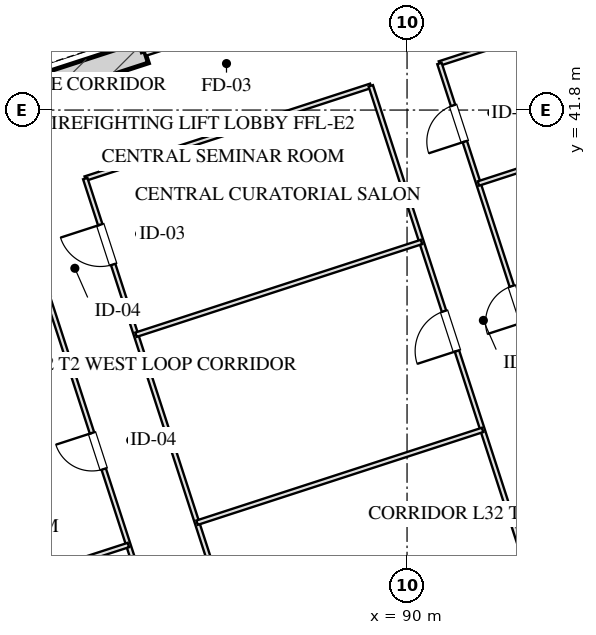
"""IFC4 building model, lengths in metres.
Left out: names, types, materials, properties, quantities, classifications, styles, units other than length and angle.
Written with IfcOpenShell. Run it as: python <this file> out.ifc"""

import sys

from ifc_helpers import new_model, si_unit, direction, frame, frame_2d, origin, place, context, subcontext, project, spatial, rectangle, extrude, element, fill, save


model = new_model("IFC4")
c1 = context("Model", 3, precision=1e-05, world=origin(), true_north=direction((0.0, 1.0)))
c2 = subcontext(c1, "Body", "Model", "MODEL_VIEW")
j1 = project(units=[si_unit("LENGTHUNIT", "METRE"), si_unit("PLANEANGLEUNIT", "RADIAN")], contexts=[c1])
p1 = place(None, origin())
s1 = spatial("IfcSite", under=j1, at=p1, CompositionType="ELEMENT")
p2 = place(p1, origin())
s2 = spatial("IfcBuilding", under=s1, at=p2, CompositionType="ELEMENT")
p3 = place(p2, frame((0.0, 0.0, 124.2)))
s3 = spatial("IfcBuildingStorey", under=s2, at=p3, CompositionType="ELEMENT", Elevation=124.2)
p4 = place(p3, frame((79.087, 42.021, 0.0), z_axis=(0.0, 0.0, 1.0), x_axis=(0.951062550203, 0.3089984233, 0.0)))
e1 = element("IfcWall", 1, at=p4, inside=s3, PredefinedType="SHEAR", context=c2, shape_type="SweptSolid", body=[
    extrude(rectangle(XDim=4.22, YDim=0.6, at=frame_2d((2.11, 0.0))), origin(), (0.0, 0.0, 1.0), 3.45),
])
p5 = place(p3, frame((80.716, 6.59, 0.0), z_axis=(0.0, 0.0, 1.0), x_axis=(-0.309017542002, 0.95105633836, 0.0)))
e2 = element("IfcWall", 2, at=p5, inside=s3, PredefinedType="SOLIDWALL", context=c2, shape_type="SweptSolid", body=[
    extrude(rectangle(XDim=46.4, YDim=0.4, at=frame_2d((23.2, 0.0))), origin(), (0.0, 0.0, 1.0), 2.61),
])
p6 = place(p5, frame((28.4, 0.0, 0.75)))
e3 = element("IfcOpeningElement", 3, at=p6, cuts=e2, PredefinedType="OPENING", context=c2, shape_type="SweptSolid", body=[
    extrude(rectangle(XDim=2.4, YDim=1.46, at=frame_2d((1.2, 0.73))), frame((0.0, 0.21, 0.0), z_axis=(0.0, -1.0, 0.0), x_axis=(1.0, 0.0, 0.0)), (0.0, 0.0, 1.0), 0.42),
])
p7 = place(p5, frame((18.25, 0.0, 0.0)))
e4 = element("IfcOpeningElement", 4, at=p7, cuts=e2, PredefinedType="OPENING", context=c2, shape_type="SweptSolid", body=[
    extrude(rectangle(XDim=1.1, YDim=2.15, at=frame_2d((0.55, 1.075))), frame((0.0, 0.21, 0.0), z_axis=(0.0, -1.0, 0.0), x_axis=(1.0, 0.0, 0.0)), (0.0, 0.0, 1.0), 0.42),
])
p8 = place(p3, frame((83.101, 43.324, 0.0), z_axis=(0.0, 0.0, 1.0), x_axis=(-0.309048298632, 0.951046344356, 0.0)))
e5 = element("IfcWall", 5, at=p8, inside=s3, PredefinedType="PARTITIONING", context=c2, shape_type="SweptSolid", body=[
    extrude(rectangle(XDim=1.9, YDim=0.2, at=frame_2d((0.95, 0.0))), origin(), (0.0, 0.0, 1.0), 3.175),
])
p9 = place(p8, frame((0.52, 0.0, 0.0)))
e6 = element("IfcOpeningElement", 6, at=p9, cuts=e5, PredefinedType="OPENING", context=c2, shape_type="SweptSolid", body=[
    extrude(rectangle(XDim=1.1, YDim=2.05, at=frame_2d((0.55, 1.025))), frame((0.0, 0.11, 0.0), z_axis=(0.0, -1.0, 0.0), x_axis=(1.0, 0.0, 0.0)), (0.0, 0.0, 1.0), 0.22),
])
p10 = place(p3, frame((83.101, 43.324, 0.0), z_axis=(0.0, 0.0, 1.0), x_axis=(0.951052804469, 0.309028417967, 0.0)))
e7 = element("IfcWall", 7, at=p10, inside=s3, PredefinedType="PARTITIONING", context=c2, shape_type="SweptSolid", body=[
    extrude(rectangle(XDim=3.83, YDim=0.2, at=frame_2d((1.915, 0.0))), origin(), (0.0, 0.0, 1.0), 3.175),
])
p11 = place(p10, frame((1.35, 0.0, 0.0)))
e8 = element("IfcOpeningElement", 8, at=p11, cuts=e7, PredefinedType="OPENING", context=c2, shape_type="SweptSolid", body=[
    extrude(rectangle(XDim=1.2, YDim=2.05, at=frame_2d((0.6, 1.025))), frame((0.0, 0.11, 0.0), z_axis=(0.0, -1.0, 0.0), x_axis=(1.0, 0.0, 0.0)), (0.0, 0.0, 1.0), 0.22),
])
p12 = place(p3, frame((81.532, 39.997, 0.0), z_axis=(0.0, 0.0, 1.0), x_axis=(0.951048148493, 0.309042746635, 0.0)))
e9 = element("IfcWall", 9, at=p12, inside=s3, PredefinedType="PARTITIONING", context=c2, shape_type="SweptSolid", body=[
    extrude(rectangle(XDim=7.9, YDim=0.12, at=frame_2d((3.95, 0.0))), origin(), (0.0, 0.0, 1.0), 3.175),
])
p13 = place(p3, frame((90.853, 43.025, 0.0), z_axis=(0.0, 0.0, 1.0), x_axis=(0.951054001411, 0.309024734286, 0.0)))
e10 = element("IfcWall", 10, at=p13, inside=s3, PredefinedType="PARTITIONING", context=c2, shape_type="SweptSolid", body=[
    extrude(rectangle(XDim=13.5, YDim=0.12, at=frame_2d((6.75, 0.0))), origin(), (0.0, 0.0, 1.0), 3.175),
])
p14 = place(p3, frame((84.867, 23.584, 0.0), z_axis=(0.0, 0.0, 1.0), x_axis=(-0.309022042254, 0.951054876125, 0.0)))
e11 = element("IfcWall", 11, at=p14, inside=s3, PredefinedType="PARTITIONING", context=c2, shape_type="SweptSolid", body=[
    extrude(rectangle(XDim=16.64, YDim=0.12, at=frame_2d((8.32, 0.0))), origin(), (0.0, 0.0, 1.0), 3.175),
])
p15 = place(p14, frame((3.06, 0.0, 0.0)))
e12 = element("IfcOpeningElement", 12, at=p15, cuts=e11, PredefinedType="OPENING", context=c2, shape_type="SweptSolid", body=[
    extrude(rectangle(XDim=1.0, YDim=2.05, at=frame_2d((0.5, 1.025))), frame((0.0, 0.07, 0.0), z_axis=(0.0, -1.0, 0.0), x_axis=(1.0, 0.0, 0.0)), (0.0, 0.0, 1.0), 0.14),
])
p16 = place(p14, frame((9.22, 0.0, 0.0)))
e13 = element("IfcOpeningElement", 13, at=p16, cuts=e11, PredefinedType="OPENING", context=c2, shape_type="SweptSolid", body=[
    extrude(rectangle(XDim=1.0, YDim=2.05, at=frame_2d((0.5, 1.025))), frame((0.0, 0.07, 0.0), z_axis=(0.0, -1.0, 0.0), x_axis=(1.0, 0.0, 0.0)), (0.0, 0.0, 1.0), 0.14),
])
p17 = place(p14, frame((13.98, 0.0, 0.0)))
e14 = element("IfcOpeningElement", 14, at=p17, cuts=e11, PredefinedType="OPENING", context=c2, shape_type="SweptSolid", body=[
    extrude(rectangle(XDim=1.0, YDim=2.05, at=frame_2d((0.5, 1.025))), frame((0.0, 0.07, 0.0), z_axis=(0.0, -1.0, 0.0), x_axis=(1.0, 0.0, 0.0)), (0.0, 0.0, 1.0), 0.14),
])
p18 = place(p3, frame((86.675, 24.171, 0.0), z_axis=(0.0, 0.0, 1.0), x_axis=(-0.309022042254, 0.951054876125, 0.0)))
e15 = element("IfcWall", 15, at=p18, inside=s3, PredefinedType="PARTITIONING", context=c2, shape_type="SweptSolid", body=[
    extrude(rectangle(XDim=16.64, YDim=0.12, at=frame_2d((8.32, 0.0))), origin(), (0.0, 0.0, 1.0), 3.175),
])
p19 = place(p18, frame((3.204, 0.0, 0.0)))
e16 = element("IfcOpeningElement", 16, at=p19, cuts=e15, PredefinedType="OPENING", context=c2, shape_type="SweptSolid", body=[
    extrude(rectangle(XDim=1.1, YDim=2.05, at=frame_2d((0.55, 1.025))), frame((0.0, 0.07, 0.0), z_axis=(0.0, -1.0, 0.0), x_axis=(1.0, 0.0, 0.0)), (0.0, 0.0, 1.0), 0.14),
])
p20 = place(p18, frame((14.264, 0.0, 0.0)))
e17 = element("IfcOpeningElement", 17, at=p20, cuts=e15, PredefinedType="OPENING", context=c2, shape_type="SweptSolid", body=[
    extrude(rectangle(XDim=1.1, YDim=2.05, at=frame_2d((0.55, 1.025))), frame((0.0, 0.07, 0.0), z_axis=(0.0, -1.0, 0.0), x_axis=(1.0, 0.0, 0.0)), (0.0, 0.0, 1.0), 0.14),
])
p21 = place(p3, frame((94.188, 26.613, 0.0), z_axis=(0.0, 0.0, 1.0), x_axis=(-0.30901773025, 0.951056277195, 0.0)))
e18 = element("IfcWall", 18, at=p21, inside=s3, PredefinedType="PARTITIONING", context=c2, shape_type="SweptSolid", body=[
    extrude(rectangle(XDim=16.64, YDim=0.12, at=frame_2d((8.32, 0.0))), origin(), (0.0, 0.0, 1.0), 3.175),
])
p22 = place(p21, frame((9.304, 0.0, 0.0)))
e19 = element("IfcOpeningElement", 19, at=p22, cuts=e18, PredefinedType="OPENING", context=c2, shape_type="SweptSolid", body=[
    extrude(rectangle(XDim=1.1, YDim=2.05, at=frame_2d((0.55, 1.025))), frame((0.0, 0.07, 0.0), z_axis=(0.0, -1.0, 0.0), x_axis=(1.0, 0.0, 0.0)), (0.0, 0.0, 1.0), 0.14),
])
p23 = place(p3, frame((95.995, 27.2, 0.0), z_axis=(0.0, 0.0, 1.0), x_axis=(-0.309022042254, 0.951054876125, 0.0)))
e20 = element("IfcWall", 20, at=p23, inside=s3, PredefinedType="PARTITIONING", context=c2, shape_type="SweptSolid", body=[
    extrude(rectangle(XDim=16.64, YDim=0.12, at=frame_2d((8.32, 0.0))), origin(), (0.0, 0.0, 1.0), 3.175),
])
p24 = place(p23, frame((1.16, 0.0, 0.0)))
e21 = element("IfcOpeningElement", 21, at=p24, cuts=e20, PredefinedType="OPENING", context=c2, shape_type="SweptSolid", body=[
    extrude(rectangle(XDim=0.85, YDim=2.05, at=frame_2d((0.425, 1.025))), frame((0.0, 0.07, 0.0), z_axis=(0.0, -1.0, 0.0), x_axis=(1.0, 0.0, 0.0)), (0.0, 0.0, 1.0), 0.14),
])
p25 = place(p23, frame((5.48, 0.0, 0.0)))
e22 = element("IfcOpeningElement", 22, at=p25, cuts=e20, PredefinedType="OPENING", context=c2, shape_type="SweptSolid", body=[
    extrude(rectangle(XDim=1.0, YDim=2.05, at=frame_2d((0.5, 1.025))), frame((0.0, 0.07, 0.0), z_axis=(0.0, -1.0, 0.0), x_axis=(1.0, 0.0, 0.0)), (0.0, 0.0, 1.0), 0.14),
])
p26 = place(p23, frame((9.48, 0.0, 0.0)))
e23 = element("IfcOpeningElement", 23, at=p26, cuts=e20, PredefinedType="OPENING", context=c2, shape_type="SweptSolid", body=[
    extrude(rectangle(XDim=1.0, YDim=2.05, at=frame_2d((0.5, 1.025))), frame((0.0, 0.07, 0.0), z_axis=(0.0, -1.0, 0.0), x_axis=(1.0, 0.0, 0.0)), (0.0, 0.0, 1.0), 0.14),
])
p27 = place(p23, frame((14.48, 0.0, 0.0)))
e24 = element("IfcOpeningElement", 24, at=p27, cuts=e20, PredefinedType="OPENING", context=c2, shape_type="SweptSolid", body=[
    extrude(rectangle(XDim=1.0, YDim=2.05, at=frame_2d((0.5, 1.025))), frame((0.0, 0.07, 0.0), z_axis=(0.0, -1.0, 0.0), x_axis=(1.0, 0.0, 0.0)), (0.0, 0.0, 1.0), 0.14),
])
for number, where, z_axis, x_axis in (
    (25, (84.474, 30.943, 0.0), (0.0, 0.0, 1.0), (0.951, 0.309, 0.0)),
    (26, (82.867, 35.888, 0.0), (0.0, 0.0, 1.0), (0.951, 0.309, 0.0)),
):
    element("IfcWall", number, at=place(p3, frame(where, z_axis=z_axis, x_axis=x_axis)), inside=s3, PredefinedType="PARTITIONING", context=c2, shape_type="SweptSolid", body=[
        extrude(rectangle(XDim=7.9, YDim=0.12, at=frame_2d((3.95, 0.0))), origin(), (0.0, 0.0, 1.0), 3.175),
    ])
p28 = place(p3, frame((74.108, 27.574, 0.0), z_axis=(0.0, 0.0, 1.0), x_axis=(0.951054001411, 0.309024734286, 0.0)))
e27 = element("IfcWall", 27, at=p28, inside=s3, PredefinedType="PARTITIONING", context=c2, shape_type="SweptSolid", body=[
    extrude(rectangle(XDim=9.0, YDim=0.12, at=frame_2d((4.5, 0.0))), origin(), (0.0, 0.0, 1.0), 3.175),
])
p29 = place(p3, frame((72.501, 32.52, 0.0), z_axis=(0.0, 0.0, 1.0), x_axis=(0.951051410833, 0.309032706929, 0.0)))
e28 = element("IfcWall", 28, at=p29, inside=s3, PredefinedType="PARTITIONING", context=c2, shape_type="SweptSolid", body=[
    extrude(rectangle(XDim=9.0, YDim=0.12, at=frame_2d((4.5, 0.0))), origin(), (0.0, 0.0, 1.0), 3.175),
])
p30 = place(p3, frame((91.879, 39.868, 0.0), z_axis=(0.0, 0.0, 1.0), x_axis=(0.951054001411, 0.309024734286, 0.0)))
e29 = element("IfcWall", 29, at=p30, inside=s3, PredefinedType="PARTITIONING", context=c2, shape_type="SweptSolid", body=[
    extrude(rectangle(XDim=13.5, YDim=0.12, at=frame_2d((6.75, 0.0))), origin(), (0.0, 0.0, 1.0), 3.175),
])
p31 = place(p16, origin())
e30 = element("IfcDoor", 30, at=p31, inside=s3, OperationType="SINGLE_SWING_RIGHT", PredefinedType="DOOR", context=c2, shape_type="SweptSolid", body=[
    extrude(rectangle(XDim=1.0, YDim=2.05, at=frame_2d((0.5, 1.025))), frame((0.0, 0.025, 0.0), z_axis=(0.0, -1.0, 0.0), x_axis=(1.0, 0.0, 0.0)), (0.0, 0.0, 1.0), 0.05),
])
fill(e13, e30)
p32 = place(p20, origin())
e31 = element("IfcDoor", 31, at=p32, inside=s3, OperationType="SINGLE_SWING_RIGHT", PredefinedType="DOOR", context=c2, shape_type="SweptSolid", body=[
    extrude(rectangle(XDim=1.1, YDim=2.05, at=frame_2d((0.55, 1.025))), frame((0.0, 0.025, 0.0), z_axis=(0.0, -1.0, 0.0), x_axis=(1.0, 0.0, 0.0)), (0.0, 0.0, 1.0), 0.05),
])
fill(e17, e31)
p33 = place(p22, origin())
e32 = element("IfcDoor", 32, at=p33, inside=s3, OperationType="SINGLE_SWING_LEFT", PredefinedType="DOOR", context=c2, shape_type="SweptSolid", body=[
    extrude(rectangle(XDim=1.1, YDim=2.05, at=frame_2d((0.55, 1.025))), frame((0.0, 0.025, 0.0), z_axis=(0.0, -1.0, 0.0), x_axis=(1.0, 0.0, 0.0)), (0.0, 0.0, 1.0), 0.05),
])
fill(e19, e32)
p34 = place(p26, origin())
e33 = element("IfcDoor", 33, at=p34, inside=s3, OperationType="SINGLE_SWING_LEFT", PredefinedType="DOOR", context=c2, shape_type="SweptSolid", body=[
    extrude(rectangle(XDim=1.0, YDim=2.05, at=frame_2d((0.5, 1.025))), frame((0.0, 0.025, 0.0), z_axis=(0.0, -1.0, 0.0), x_axis=(1.0, 0.0, 0.0)), (0.0, 0.0, 1.0), 0.05),
])
fill(e23, e33)
p35 = place(p27, origin())
e34 = element("IfcDoor", 34, at=p35, inside=s3, OperationType="SINGLE_SWING_LEFT", PredefinedType="DOOR", context=c2, shape_type="SweptSolid", body=[
    extrude(rectangle(XDim=1.0, YDim=2.05, at=frame_2d((0.5, 1.025))), frame((0.0, 0.025, 0.0), z_axis=(0.0, -1.0, 0.0), x_axis=(1.0, 0.0, 0.0)), (0.0, 0.0, 1.0), 0.05),
])
fill(e24, e34)
save(model, sys.argv[1])
